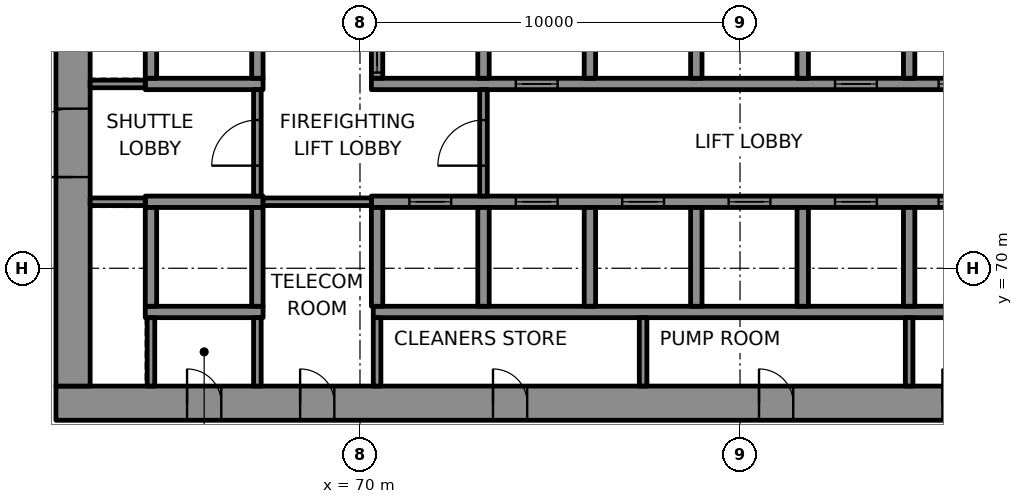
"""IFC4 building model, lengths in metres.
Left out: names, types, materials, properties, quantities, classifications, styles, units other than length and angle.
Written with IfcOpenShell. Run it as: python <this file> out.ifc"""

import sys

from ifc_helpers import new_model, si_unit, direction, frame, frame_2d, origin, place, context, subcontext, project, spatial, rectangle, extrude, element, fill, save


model = new_model("IFC4")
c1 = context("Model", 3, precision=1e-05, world=origin(), true_north=direction((0.0, 1.0)))
c2 = subcontext(c1, "Body", "Model", "MODEL_VIEW")
j1 = project(units=[si_unit("LENGTHUNIT", "METRE"), si_unit("PLANEANGLEUNIT", "RADIAN")], contexts=[c1])
p1 = place(None, origin())
s1 = spatial("IfcSite", under=j1, at=p1, CompositionType="ELEMENT")
p2 = place(p1, origin())
s2 = spatial("IfcBuilding", under=s1, at=p2, CompositionType="ELEMENT")
p3 = place(p2, frame((0.0, 0.0, 26.4)))
s3 = spatial("IfcBuildingStorey", under=s2, at=p3, CompositionType="ELEMENT", Elevation=26.4)
p4 = place(p3, frame((62.0, 66.45, 0.0), z_axis=(0.0, 0.0, 1.0), x_axis=(1.0, 0.0, 0.0)))
e1 = element("IfcWall", 1, at=p4, inside=s3, PredefinedType="SHEAR", context=c2, shape_type="SweptSolid", body=[
    extrude(rectangle(XDim=26.0, YDim=0.9, at=frame_2d((13.0, 0.0))), origin(), (0.0, 0.0, 1.0), 4.15),
])
p5 = place(p4, frame((3.45, 0.0, 0.0)))
e2 = element("IfcOpeningElement", 2, at=p5, cuts=e1, PredefinedType="OPENING", context=c2, shape_type="SweptSolid", body=[
    extrude(rectangle(XDim=0.9, YDim=2.1, at=frame_2d((0.45, 1.05))), frame((0.0, 0.46, 0.0), z_axis=(0.0, -1.0, 0.0), x_axis=(1.0, 0.0, 0.0)), (0.0, 0.0, 1.0), 0.92),
])
p6 = place(p4, frame((6.425, 0.0, 0.0)))
e3 = element("IfcOpeningElement", 3, at=p6, cuts=e1, PredefinedType="OPENING", context=c2, shape_type="SweptSolid", body=[
    extrude(rectangle(XDim=0.9, YDim=2.1, at=frame_2d((0.45, 1.05))), frame((0.0, 0.46, 0.0), z_axis=(0.0, -1.0, 0.0), x_axis=(1.0, 0.0, 0.0)), (0.0, 0.0, 1.0), 0.92),
])
p7 = place(p4, frame((11.5, 0.0, 0.0)))
e4 = element("IfcOpeningElement", 4, at=p7, cuts=e1, PredefinedType="OPENING", context=c2, shape_type="SweptSolid", body=[
    extrude(rectangle(XDim=0.9, YDim=2.1, at=frame_2d((0.45, 1.05))), frame((0.0, 0.46, 0.0), z_axis=(0.0, -1.0, 0.0), x_axis=(1.0, 0.0, 0.0)), (0.0, 0.0, 1.0), 0.92),
])
p8 = place(p4, frame((18.5, 0.0, 0.0)))
e5 = element("IfcOpeningElement", 5, at=p8, cuts=e1, PredefinedType="OPENING", context=c2, shape_type="SweptSolid", body=[
    extrude(rectangle(XDim=0.9, YDim=2.1, at=frame_2d((0.45, 1.05))), frame((0.0, 0.46, 0.0), z_axis=(0.0, -1.0, 0.0), x_axis=(1.0, 0.0, 0.0)), (0.0, 0.0, 1.0), 0.92),
])
p9 = place(p4, frame((23.325, 0.0, 0.0)))
e6 = element("IfcOpeningElement", 6, at=p9, cuts=e1, PredefinedType="OPENING", context=c2, shape_type="SweptSolid", body=[
    extrude(rectangle(XDim=0.9, YDim=2.1, at=frame_2d((0.45, 1.05))), frame((0.0, 0.46, 0.0), z_axis=(0.0, -1.0, 0.0), x_axis=(1.0, 0.0, 0.0)), (0.0, 0.0, 1.0), 0.92),
])
p10 = place(p3, frame((62.45, 66.9, 0.0), z_axis=(0.0, 0.0, 1.0), x_axis=(0.0, 1.0, 0.0)))
e7 = element("IfcWall", 7, at=p10, inside=s3, PredefinedType="SHEAR", context=c2, shape_type="SweptSolid", body=[
    extrude(rectangle(XDim=16.2, YDim=0.9, at=frame_2d((8.1, 0.0))), origin(), (0.0, 0.0, 1.0), 4.15),
])
p11 = place(p10, frame((5.5, 0.0, 0.0)))
e8 = element("IfcOpeningElement", 8, at=p11, cuts=e7, PredefinedType="OPENING", context=c2, shape_type="SweptSolid", body=[
    extrude(rectangle(XDim=1.8, YDim=2.1, at=frame_2d((0.9, 1.05))), frame((0.0, 0.46, 0.0), z_axis=(0.0, -1.0, 0.0), x_axis=(1.0, 0.0, 0.0)), (0.0, 0.0, 1.0), 0.92),
])
p12 = place(p3, frame((64.35, 68.85, 0.0), z_axis=(0.0, 0.0, 1.0), x_axis=(1.0, 0.0, 0.0)))
e9 = element("IfcWall", 9, at=p12, inside=s3, PredefinedType="SHEAR", context=c2, shape_type="SweptSolid", body=[
    extrude(rectangle(XDim=3.1, YDim=0.3, at=frame_2d((1.55, 0.0))), origin(), (0.0, 0.0, 1.0), 4.15),
])
p13 = place(p3, frame((70.35, 68.85, 0.0), z_axis=(0.0, 0.0, 1.0), x_axis=(1.0, 0.0, 0.0)))
e10 = element("IfcWall", 10, at=p13, inside=s3, PredefinedType="SHEAR", context=c2, shape_type="SweptSolid", body=[
    extrude(rectangle(XDim=16.75, YDim=0.3, at=frame_2d((8.375, 0.0))), origin(), (0.0, 0.0, 1.0), 4.15),
])
p14 = place(p3, frame((64.35, 71.75, 0.0), z_axis=(0.0, 0.0, 1.0), x_axis=(1.0, 0.0, 0.0)))
e11 = element("IfcWall", 11, at=p14, inside=s3, PredefinedType="SHEAR", context=c2, shape_type="SweptSolid", body=[
    extrude(rectangle(XDim=3.1, YDim=0.3, at=frame_2d((1.55, 0.0))), origin(), (0.0, 0.0, 1.0), 4.15),
])
p15 = place(p3, frame((70.3, 71.75, 0.0), z_axis=(0.0, 0.0, 1.0), x_axis=(1.0, 0.0, 0.0)))
e12 = element("IfcWall", 12, at=p15, inside=s3, PredefinedType="SHEAR", context=c2, shape_type="SweptSolid", body=[
    extrude(rectangle(XDim=16.8, YDim=0.3, at=frame_2d((8.4, 0.0))), origin(), (0.0, 0.0, 1.0), 4.15),
])
p16 = place(p15, frame((1.0, 0.0, 0.0)))
e13 = element("IfcOpeningElement", 13, at=p16, cuts=e12, PredefinedType="OPENING", context=c2, shape_type="SweptSolid", body=[
    extrude(rectangle(XDim=1.1, YDim=2.1, at=frame_2d((0.55, 1.05))), frame((0.0, 0.16, 0.0), z_axis=(0.0, -1.0, 0.0), x_axis=(1.0, 0.0, 0.0)), (0.0, 0.0, 1.0), 0.32),
])
p17 = place(p15, frame((3.8, 0.0, 0.0)))
e14 = element("IfcOpeningElement", 14, at=p17, cuts=e12, PredefinedType="OPENING", context=c2, shape_type="SweptSolid", body=[
    extrude(rectangle(XDim=1.1, YDim=2.1, at=frame_2d((0.55, 1.05))), frame((0.0, 0.16, 0.0), z_axis=(0.0, -1.0, 0.0), x_axis=(1.0, 0.0, 0.0)), (0.0, 0.0, 1.0), 0.32),
])
p18 = place(p15, frame((6.6, 0.0, 0.0)))
e15 = element("IfcOpeningElement", 15, at=p18, cuts=e12, PredefinedType="OPENING", context=c2, shape_type="SweptSolid", body=[
    extrude(rectangle(XDim=1.1, YDim=2.1, at=frame_2d((0.55, 1.05))), frame((0.0, 0.16, 0.0), z_axis=(0.0, -1.0, 0.0), x_axis=(1.0, 0.0, 0.0)), (0.0, 0.0, 1.0), 0.32),
])
p19 = place(p15, frame((9.4, 0.0, 0.0)))
e16 = element("IfcOpeningElement", 16, at=p19, cuts=e12, PredefinedType="OPENING", context=c2, shape_type="SweptSolid", body=[
    extrude(rectangle(XDim=1.1, YDim=2.1, at=frame_2d((0.55, 1.05))), frame((0.0, 0.16, 0.0), z_axis=(0.0, -1.0, 0.0), x_axis=(1.0, 0.0, 0.0)), (0.0, 0.0, 1.0), 0.32),
])
p20 = place(p15, frame((12.2, 0.0, 0.0)))
e17 = element("IfcOpeningElement", 17, at=p20, cuts=e12, PredefinedType="OPENING", context=c2, shape_type="SweptSolid", body=[
    extrude(rectangle(XDim=1.1, YDim=2.1, at=frame_2d((0.55, 1.05))), frame((0.0, 0.16, 0.0), z_axis=(0.0, -1.0, 0.0), x_axis=(1.0, 0.0, 0.0)), (0.0, 0.0, 1.0), 0.32),
])
p21 = place(p15, frame((14.925, 0.0, 0.0)))
e18 = element("IfcOpeningElement", 18, at=p21, cuts=e12, PredefinedType="OPENING", context=c2, shape_type="SweptSolid", body=[
    extrude(rectangle(XDim=1.1, YDim=2.1, at=frame_2d((0.55, 1.05))), frame((0.0, 0.16, 0.0), z_axis=(0.0, -1.0, 0.0), x_axis=(1.0, 0.0, 0.0)), (0.0, 0.0, 1.0), 0.32),
])
p22 = place(p3, frame((64.35, 74.85, 0.0), z_axis=(0.0, 0.0, 1.0), x_axis=(1.0, 0.0, 0.0)))
e19 = element("IfcWall", 19, at=p22, inside=s3, PredefinedType="SHEAR", context=c2, shape_type="SweptSolid", body=[
    extrude(rectangle(XDim=3.1, YDim=0.3, at=frame_2d((1.55, 0.0))), origin(), (0.0, 0.0, 1.0), 4.15),
])
p23 = place(p3, frame((70.3, 74.85, 0.0), z_axis=(0.0, 0.0, 1.0), x_axis=(1.0, 0.0, 0.0)))
e20 = element("IfcWall", 20, at=p23, inside=s3, PredefinedType="SHEAR", context=c2, shape_type="SweptSolid", body=[
    extrude(rectangle(XDim=16.8, YDim=0.3, at=frame_2d((8.4, 0.0))), origin(), (0.0, 0.0, 1.0), 4.15),
])
p24 = place(p23, frame((3.8, 0.0, 0.0)))
e21 = element("IfcOpeningElement", 21, at=p24, cuts=e20, PredefinedType="OPENING", context=c2, shape_type="SweptSolid", body=[
    extrude(rectangle(XDim=1.1, YDim=2.1, at=frame_2d((0.55, 1.05))), frame((0.0, 0.16, 0.0), z_axis=(0.0, -1.0, 0.0), x_axis=(1.0, 0.0, 0.0)), (0.0, 0.0, 1.0), 0.32),
])
p25 = place(p23, frame((12.2, 0.0, 0.0)))
e22 = element("IfcOpeningElement", 22, at=p25, cuts=e20, PredefinedType="OPENING", context=c2, shape_type="SweptSolid", body=[
    extrude(rectangle(XDim=1.1, YDim=2.1, at=frame_2d((0.55, 1.05))), frame((0.0, 0.16, 0.0), z_axis=(0.0, -1.0, 0.0), x_axis=(1.0, 0.0, 0.0)), (0.0, 0.0, 1.0), 0.32),
])
p26 = place(p23, frame((14.925, 0.0, 0.0)))
e23 = element("IfcOpeningElement", 23, at=p26, cuts=e20, PredefinedType="OPENING", context=c2, shape_type="SweptSolid", body=[
    extrude(rectangle(XDim=1.1, YDim=2.1, at=frame_2d((0.55, 1.05))), frame((0.0, 0.16, 0.0), z_axis=(0.0, -1.0, 0.0), x_axis=(1.0, 0.0, 0.0)), (0.0, 0.0, 1.0), 0.32),
])
for number, where, z_axis, x_axis in (
    (24, (64.5, 69.0, 0.0), (0.0, 0.0, 1.0), (0.0, 1.0, 0.0)),
    (25, (64.5, 75.0, 0.0), (0.0, 0.0, 1.0), (0.0, 1.0, 0.0)),
    (26, (67.3, 69.0, 0.0), (0.0, 0.0, 1.0), (0.0, 1.0, 0.0)),
    (27, (67.3, 75.0, 0.0), (0.0, 0.0, 1.0), (0.0, 1.0, 0.0)),
    (28, (70.45, 69.0, 0.0), (0.0, 0.0, 1.0), (0.0, 1.0, 0.0)),
):
    element("IfcWall", number, at=place(p3, frame(where, z_axis=z_axis, x_axis=x_axis)), inside=s3, PredefinedType="SHEAR", context=c2, shape_type="SweptSolid", body=[
        extrude(rectangle(XDim=2.6, YDim=0.3, at=frame_2d((1.3, 0.0))), origin(), (0.0, 0.0, 1.0), 4.15),
    ])
p27 = place(p3, frame((70.45, 75.0, 0.0), z_axis=(0.0, 0.0, 1.0), x_axis=(0.0, 1.0, 0.0)))
e29 = element("IfcWall", 29, at=p27, inside=s3, PredefinedType="SHEAR", context=c2, shape_type="SweptSolid", body=[
    extrude(rectangle(XDim=2.6, YDim=0.3, at=frame_2d((1.3, 0.0))), origin(), (0.0, 0.0, 1.0), 4.15),
])
p28 = place(p27, frame((0.15, 0.0, 0.0)))
e30 = element("IfcOpeningElement", 30, at=p28, cuts=e29, PredefinedType="OPENING", context=c2, shape_type="SweptSolid", body=[
    extrude(rectangle(XDim=1.1, YDim=2.1, at=frame_2d((0.55, 1.05))), frame((0.0, 0.16, 0.0), z_axis=(0.0, -1.0, 0.0), x_axis=(1.0, 0.0, 0.0)), (0.0, 0.0, 1.0), 0.32),
])
for number, where, z_axis, x_axis in (
    (31, (73.25, 69.0, 0.0), (0.0, 0.0, 1.0), (0.0, 1.0, 0.0)),
    (32, (73.25, 75.0, 0.0), (0.0, 0.0, 1.0), (0.0, 1.0, 0.0)),
    (33, (76.05, 69.0, 0.0), (0.0, 0.0, 1.0), (0.0, 1.0, 0.0)),
    (34, (76.05, 75.0, 0.0), (0.0, 0.0, 1.0), (0.0, 1.0, 0.0)),
    (35, (78.85, 69.0, 0.0), (0.0, 0.0, 1.0), (0.0, 1.0, 0.0)),
    (36, (78.85, 75.0, 0.0), (0.0, 0.0, 1.0), (0.0, 1.0, 0.0)),
    (37, (81.65, 69.0, 0.0), (0.0, 0.0, 1.0), (0.0, 1.0, 0.0)),
    (38, (81.65, 75.0, 0.0), (0.0, 0.0, 1.0), (0.0, 1.0, 0.0)),
    (39, (84.45, 69.0, 0.0), (0.0, 0.0, 1.0), (0.0, 1.0, 0.0)),
    (40, (84.45, 75.0, 0.0), (0.0, 0.0, 1.0), (0.0, 1.0, 0.0)),
):
    element("IfcWall", number, at=place(p3, frame(where, z_axis=z_axis, x_axis=x_axis)), inside=s3, PredefinedType="SHEAR", context=c2, shape_type="SweptSolid", body=[
        extrude(rectangle(XDim=2.6, YDim=0.3, at=frame_2d((1.3, 0.0))), origin(), (0.0, 0.0, 1.0), 4.15),
    ])
p29 = place(p3, frame((62.9, 71.75, 0.0), z_axis=(0.0, 0.0, 1.0), x_axis=(1.0, 0.0, 0.0)))
e41 = element("IfcWall", 41, at=p29, inside=s3, PredefinedType="PARTITIONING", context=c2, shape_type="SweptSolid", body=[
    extrude(rectangle(XDim=1.45, YDim=0.2, at=frame_2d((0.725, 0.0))), origin(), (0.0, 0.0, 1.0), 4.15),
])
p30 = place(p3, frame((67.45, 71.75, 0.0), z_axis=(0.0, 0.0, 1.0), x_axis=(1.0, 0.0, 0.0)))
e42 = element("IfcWall", 42, at=p30, inside=s3, PredefinedType="PARTITIONING", context=c2, shape_type="SweptSolid", body=[
    extrude(rectangle(XDim=2.85, YDim=0.2, at=frame_2d((1.425, 0.0))), origin(), (0.0, 0.0, 1.0), 4.15),
])
p31 = place(p3, frame((62.9, 74.85, 0.0), z_axis=(0.0, 0.0, 1.0), x_axis=(1.0, 0.0, 0.0)))
e43 = element("IfcWall", 43, at=p31, inside=s3, PredefinedType="PARTITIONING", context=c2, shape_type="SweptSolid", body=[
    extrude(rectangle(XDim=1.45, YDim=0.2, at=frame_2d((0.725, 0.0))), origin(), (0.0, 0.0, 1.0), 4.15),
])
for number, where, z_axis, x_axis in (
    (44, (64.5, 66.9, 0.0), (0.0, 0.0, 1.0), (0.0, 1.0, 0.0)),
    (45, (67.3, 66.9, 0.0), (0.0, 0.0, 1.0), (0.0, 1.0, 0.0)),
):
    element("IfcWall", number, at=place(p3, frame(where, z_axis=z_axis, x_axis=x_axis)), inside=s3, PredefinedType="PARTITIONING", context=c2, shape_type="SweptSolid", body=[
        extrude(rectangle(XDim=1.8, YDim=0.2, at=frame_2d((0.9, 0.0))), origin(), (0.0, 0.0, 1.0), 4.15),
    ])
p32 = place(p3, frame((67.3, 71.9, 0.0), z_axis=(0.0, 0.0, 1.0), x_axis=(0.0, 1.0, 0.0)))
e46 = element("IfcWall", 46, at=p32, inside=s3, PredefinedType="PARTITIONING", context=c2, shape_type="SweptSolid", body=[
    extrude(rectangle(XDim=2.8, YDim=0.2, at=frame_2d((1.4, 0.0))), origin(), (0.0, 0.0, 1.0), 4.15),
])
p33 = place(p32, frame((0.8, 0.0, 0.0)))
e47 = element("IfcOpeningElement", 47, at=p33, cuts=e46, PredefinedType="OPENING", context=c2, shape_type="SweptSolid", body=[
    extrude(rectangle(XDim=1.2, YDim=2.1, at=frame_2d((0.6, 1.05))), frame((0.0, 0.11, 0.0), z_axis=(0.0, -1.0, 0.0), x_axis=(1.0, 0.0, 0.0)), (0.0, 0.0, 1.0), 0.22),
])
p34 = place(p3, frame((70.45, 66.9, 0.0), z_axis=(0.0, 0.0, 1.0), x_axis=(0.0, 1.0, 0.0)))
e48 = element("IfcWall", 48, at=p34, inside=s3, PredefinedType="PARTITIONING", context=c2, shape_type="SweptSolid", body=[
    extrude(rectangle(XDim=1.8, YDim=0.2, at=frame_2d((0.9, 0.0))), origin(), (0.0, 0.0, 1.0), 4.15),
])
p35 = place(p3, frame((73.25, 71.9, 0.0), z_axis=(0.0, 0.0, 1.0), x_axis=(0.0, 1.0, 0.0)))
e49 = element("IfcWall", 49, at=p35, inside=s3, PredefinedType="PARTITIONING", context=c2, shape_type="SweptSolid", body=[
    extrude(rectangle(XDim=2.8, YDim=0.2, at=frame_2d((1.4, 0.0))), origin(), (0.0, 0.0, 1.0), 4.15),
])
p36 = place(p35, frame((0.8, 0.0, 0.0)))
e50 = element("IfcOpeningElement", 50, at=p36, cuts=e49, PredefinedType="OPENING", context=c2, shape_type="SweptSolid", body=[
    extrude(rectangle(XDim=1.2, YDim=2.1, at=frame_2d((0.6, 1.05))), frame((0.0, 0.11, 0.0), z_axis=(0.0, -1.0, 0.0), x_axis=(1.0, 0.0, 0.0)), (0.0, 0.0, 1.0), 0.22),
])
for number, where, z_axis, x_axis in (
    (51, (77.45, 66.9, 0.0), (0.0, 0.0, 1.0), (0.0, 1.0, 0.0)),
    (52, (84.45, 66.9, 0.0), (0.0, 0.0, 1.0), (0.0, 1.0, 0.0)),
):
    element("IfcWall", number, at=place(p3, frame(where, z_axis=z_axis, x_axis=x_axis)), inside=s3, PredefinedType="PARTITIONING", context=c2, shape_type="SweptSolid", body=[
        extrude(rectangle(XDim=1.8, YDim=0.2, at=frame_2d((0.9, 0.0))), origin(), (0.0, 0.0, 1.0), 4.15),
    ])
p37 = place(p3, frame((107.02, 62.31, 0.0), z_axis=(0.0, 0.0, 1.0), x_axis=(-0.49999992739, 0.866025445706, 0.0)))
e53 = element("IfcWall", 53, at=p37, inside=s3, PredefinedType="PARAPET", context=c2, shape_type="SweptSolid", body=[
    extrude(rectangle(XDim=54.0, YDim=0.2, at=frame_2d((27.0, 0.0))), origin(), (0.0, 0.0, 1.0), 1.1),
])
p38 = place(p16, origin())
e54 = element("IfcDoor", 54, at=p38, inside=s3, OperationType="DOUBLE_DOOR_SLIDING", PredefinedType="DOOR", context=c2, shape_type="SweptSolid", body=[
    extrude(rectangle(XDim=1.1, YDim=2.1, at=frame_2d((0.55, 1.05))), frame((0.0, 0.025, 0.0), z_axis=(0.0, -1.0, 0.0), x_axis=(1.0, 0.0, 0.0)), (0.0, 0.0, 1.0), 0.05),
])
fill(e13, e54)
p39 = place(p17, origin())
e55 = element("IfcDoor", 55, at=p39, inside=s3, OperationType="DOUBLE_DOOR_SLIDING", PredefinedType="DOOR", context=c2, shape_type="SweptSolid", body=[
    extrude(rectangle(XDim=1.1, YDim=2.1, at=frame_2d((0.55, 1.05))), frame((0.0, 0.025, 0.0), z_axis=(0.0, -1.0, 0.0), x_axis=(1.0, 0.0, 0.0)), (0.0, 0.0, 1.0), 0.05),
])
fill(e14, e55)
p40 = place(p18, origin())
e56 = element("IfcDoor", 56, at=p40, inside=s3, OperationType="DOUBLE_DOOR_SLIDING", PredefinedType="DOOR", context=c2, shape_type="SweptSolid", body=[
    extrude(rectangle(XDim=1.1, YDim=2.1, at=frame_2d((0.55, 1.05))), frame((0.0, 0.025, 0.0), z_axis=(0.0, -1.0, 0.0), x_axis=(1.0, 0.0, 0.0)), (0.0, 0.0, 1.0), 0.05),
])
fill(e15, e56)
p41 = place(p19, origin())
e57 = element("IfcDoor", 57, at=p41, inside=s3, OperationType="DOUBLE_DOOR_SLIDING", PredefinedType="DOOR", context=c2, shape_type="SweptSolid", body=[
    extrude(rectangle(XDim=1.1, YDim=2.1, at=frame_2d((0.55, 1.05))), frame((0.0, 0.025, 0.0), z_axis=(0.0, -1.0, 0.0), x_axis=(1.0, 0.0, 0.0)), (0.0, 0.0, 1.0), 0.05),
])
fill(e16, e57)
p42 = place(p20, origin())
e58 = element("IfcDoor", 58, at=p42, inside=s3, OperationType="DOUBLE_DOOR_SLIDING", PredefinedType="DOOR", context=c2, shape_type="SweptSolid", body=[
    extrude(rectangle(XDim=1.1, YDim=2.1, at=frame_2d((0.55, 1.05))), frame((0.0, 0.025, 0.0), z_axis=(0.0, -1.0, 0.0), x_axis=(1.0, 0.0, 0.0)), (0.0, 0.0, 1.0), 0.05),
])
fill(e17, e58)
p43 = place(p21, origin())
e59 = element("IfcDoor", 59, at=p43, inside=s3, OperationType="DOUBLE_DOOR_SLIDING", PredefinedType="DOOR", context=c2, shape_type="SweptSolid", body=[
    extrude(rectangle(XDim=1.1, YDim=2.1, at=frame_2d((0.55, 1.05))), frame((0.0, 0.025, 0.0), z_axis=(0.0, -1.0, 0.0), x_axis=(1.0, 0.0, 0.0)), (0.0, 0.0, 1.0), 0.05),
])
fill(e18, e59)
p44 = place(p28, origin())
e60 = element("IfcDoor", 60, at=p44, inside=s3, OperationType="DOUBLE_DOOR_SLIDING", PredefinedType="DOOR", context=c2, shape_type="SweptSolid", body=[
    extrude(rectangle(XDim=1.1, YDim=2.1, at=frame_2d((0.55, 1.05))), frame((0.0, 0.025, 0.0), z_axis=(0.0, -1.0, 0.0), x_axis=(1.0, 0.0, 0.0)), (0.0, 0.0, 1.0), 0.05),
])
fill(e30, e60)
p45 = place(p24, origin())
e61 = element("IfcDoor", 61, at=p45, inside=s3, OperationType="DOUBLE_DOOR_SLIDING", PredefinedType="DOOR", context=c2, shape_type="SweptSolid", body=[
    extrude(rectangle(XDim=1.1, YDim=2.1, at=frame_2d((0.55, 1.05))), frame((0.0, 0.025, 0.0), z_axis=(0.0, -1.0, 0.0), x_axis=(1.0, 0.0, 0.0)), (0.0, 0.0, 1.0), 0.05),
])
fill(e21, e61)
p46 = place(p25, origin())
e62 = element("IfcDoor", 62, at=p46, inside=s3, OperationType="DOUBLE_DOOR_SLIDING", PredefinedType="DOOR", context=c2, shape_type="SweptSolid", body=[
    extrude(rectangle(XDim=1.1, YDim=2.1, at=frame_2d((0.55, 1.05))), frame((0.0, 0.025, 0.0), z_axis=(0.0, -1.0, 0.0), x_axis=(1.0, 0.0, 0.0)), (0.0, 0.0, 1.0), 0.05),
])
fill(e22, e62)
p47 = place(p26, origin())
e63 = element("IfcDoor", 63, at=p47, inside=s3, OperationType="DOUBLE_DOOR_SLIDING", PredefinedType="DOOR", context=c2, shape_type="SweptSolid", body=[
    extrude(rectangle(XDim=1.1, YDim=2.1, at=frame_2d((0.55, 1.05))), frame((0.0, 0.025, 0.0), z_axis=(0.0, -1.0, 0.0), x_axis=(1.0, 0.0, 0.0)), (0.0, 0.0, 1.0), 0.05),
])
fill(e23, e63)
p48 = place(p36, origin())
e64 = element("IfcDoor", 64, at=p48, inside=s3, OperationType="SINGLE_SWING_LEFT", PredefinedType="DOOR", context=c2, shape_type="SweptSolid", body=[
    extrude(rectangle(XDim=1.2, YDim=2.1, at=frame_2d((0.6, 1.05))), frame((0.0, 0.025, 0.0), z_axis=(0.0, -1.0, 0.0), x_axis=(1.0, 0.0, 0.0)), (0.0, 0.0, 1.0), 0.05),
])
fill(e50, e64)
p49 = place(p33, origin())
e65 = element("IfcDoor", 65, at=p49, inside=s3, OperationType="SINGLE_SWING_RIGHT", PredefinedType="DOOR", context=c2, shape_type="SweptSolid", body=[
    extrude(rectangle(XDim=1.2, YDim=2.1, at=frame_2d((0.6, 1.05))), frame((0.0, 0.025, 0.0), z_axis=(0.0, -1.0, 0.0), x_axis=(1.0, 0.0, 0.0)), (0.0, 0.0, 1.0), 0.05),
])
fill(e47, e65)
p50 = place(p11, origin())
e66 = element("IfcDoor", 66, at=p50, inside=s3, OperationType="SINGLE_SWING_LEFT", PredefinedType="DOOR", context=c2, shape_type="SweptSolid", body=[
    extrude(rectangle(XDim=1.8, YDim=2.1, at=frame_2d((0.9, 1.05))), frame((0.0, 0.17, 0.0), z_axis=(0.0, -1.0, 0.0), x_axis=(1.0, 0.0, 0.0)), (0.0, 0.0, 1.0), 0.34),
])
fill(e8, e66)
p51 = place(p5, origin())
e67 = element("IfcDoor", 67, at=p51, inside=s3, OperationType="SINGLE_SWING_LEFT", PredefinedType="DOOR", context=c2, shape_type="SweptSolid", body=[
    extrude(rectangle(XDim=0.9, YDim=2.1, at=frame_2d((0.45, 1.05))), frame((0.0, 0.17, 0.0), z_axis=(0.0, -1.0, 0.0), x_axis=(1.0, 0.0, 0.0)), (0.0, 0.0, 1.0), 0.34),
])
fill(e2, e67)
p52 = place(p6, origin())
e68 = element("IfcDoor", 68, at=p52, inside=s3, OperationType="SINGLE_SWING_RIGHT", PredefinedType="DOOR", context=c2, shape_type="SweptSolid", body=[
    extrude(rectangle(XDim=0.9, YDim=2.1, at=frame_2d((0.45, 1.05))), frame((0.0, 0.17, 0.0), z_axis=(0.0, -1.0, 0.0), x_axis=(1.0, 0.0, 0.0)), (0.0, 0.0, 1.0), 0.34),
])
fill(e3, e68)
p53 = place(p7, origin())
e69 = element("IfcDoor", 69, at=p53, inside=s3, OperationType="SINGLE_SWING_LEFT", PredefinedType="DOOR", context=c2, shape_type="SweptSolid", body=[
    extrude(rectangle(XDim=0.9, YDim=2.1, at=frame_2d((0.45, 1.05))), frame((0.0, 0.17, 0.0), z_axis=(0.0, -1.0, 0.0), x_axis=(1.0, 0.0, 0.0)), (0.0, 0.0, 1.0), 0.34),
])
fill(e4, e69)
p54 = place(p8, origin())
e70 = element("IfcDoor", 70, at=p54, inside=s3, OperationType="SINGLE_SWING_RIGHT", PredefinedType="DOOR", context=c2, shape_type="SweptSolid", body=[
    extrude(rectangle(XDim=0.9, YDim=2.1, at=frame_2d((0.45, 1.05))), frame((0.0, 0.17, 0.0), z_axis=(0.0, -1.0, 0.0), x_axis=(1.0, 0.0, 0.0)), (0.0, 0.0, 1.0), 0.34),
])
fill(e5, e70)
p55 = place(p9, origin())
e71 = element("IfcDoor", 71, at=p55, inside=s3, OperationType="SINGLE_SWING_LEFT", PredefinedType="DOOR", context=c2, shape_type="SweptSolid", body=[
    extrude(rectangle(XDim=0.9, YDim=2.1, at=frame_2d((0.45, 1.05))), frame((0.0, 0.17, 0.0), z_axis=(0.0, -1.0, 0.0), x_axis=(1.0, 0.0, 0.0)), (0.0, 0.0, 1.0), 0.34),
])
fill(e6, e71)
save(model, sys.argv[1])
